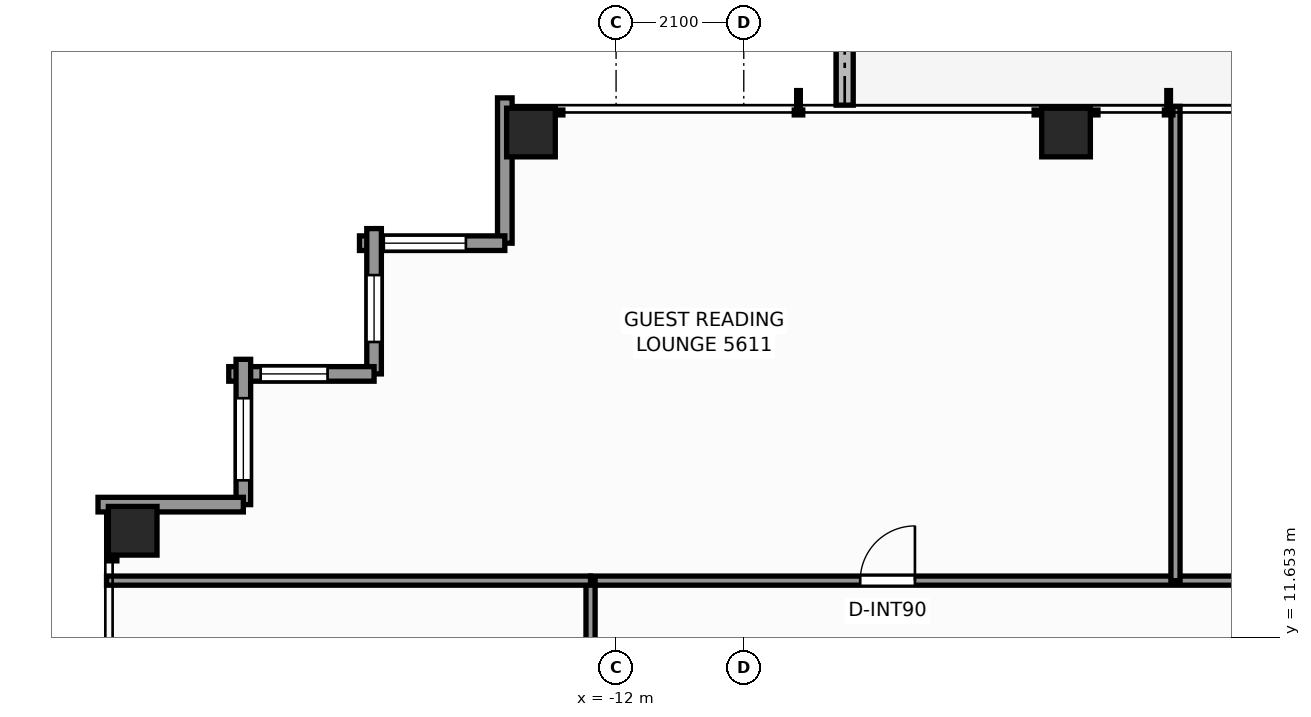
"""IFC4 building model, lengths in metres.
Left out: names, types, materials, properties, quantities, classifications, styles, units other than length and angle.
Written with IfcOpenShell. Run it as: python <this file> out.ifc"""

import sys

from ifc_helpers import new_model, si_unit, direction, frame, frame_2d, origin, origin_2d, place, context, subcontext, project, spatial, rectangle, extrude, element, fill, save


model = new_model("IFC4")
c1 = context("Model", 3, precision=1e-05, world=origin(), true_north=direction((0.0, 1.0)))
c2 = subcontext(c1, "Body", "Model", "MODEL_VIEW")
j1 = project(units=[si_unit("LENGTHUNIT", "METRE"), si_unit("PLANEANGLEUNIT", "RADIAN")], contexts=[c1])
p1 = place(None, origin())
s1 = spatial("IfcSite", under=j1, at=p1, CompositionType="ELEMENT")
p2 = place(p1, origin())
s2 = spatial("IfcBuilding", under=s1, at=p2, CompositionType="ELEMENT")
p3 = place(p2, frame((0.0, 0.0, 193.2)))
s3 = spatial("IfcBuildingStorey", under=s2, at=p3, CompositionType="ELEMENT", Elevation=193.2)
for number, where, z_axis, x_axis in (
    (1, (-13.4, 19.95, 0.0), (0.0, 0.0, 1.0), (1.0, 0.0, 0.0)),
    (2, (-4.6, 19.95, 0.0), (0.0, 0.0, 1.0), (1.0, 0.0, 0.0)),
    (3, (-19.95, 13.4, 0.0), (0.0, 0.0, 1.0), (1.0, 0.0, 0.0)),
):
    element("IfcColumn", number, at=place(p3, frame(where, z_axis=z_axis, x_axis=x_axis)), inside=s3, PredefinedType="COLUMN", context=c2, shape_type="SweptSolid", body=[
        extrude(rectangle(XDim=0.8, YDim=0.8, at=origin_2d()), origin(), (0.0, 0.0, 1.0), 3.3),
    ])
p4 = place(p3, frame((-8.24, 23.767, -0.04), z_axis=(0.0, 0.0, 1.0), x_axis=(0.0, -1.0, 0.0)))
e4 = element("IfcWall", 4, at=p4, inside=s3, PredefinedType="PARAPET", context=c2, shape_type="SweptSolid", body=[
    extrude(rectangle(XDim=3.367, YDim=0.28, at=frame_2d((1.684, 0.0))), origin(), (0.0, 0.0, 1.0), 0.42),
])
p5 = place(p3, frame((-13.83, 18.13, 0.0), z_axis=(0.0, 0.0, 1.0), x_axis=(0.0, 1.0, 0.0)))
e5 = element("IfcWall", 5, at=p5, inside=s3, PredefinedType="STANDARD", context=c2, shape_type="SweptSolid", body=[
    extrude(rectangle(XDim=2.39, YDim=0.24, at=frame_2d((1.195, 0.0))), origin(), (0.0, 0.0, 1.0), 2.463),
])
p6 = place(p3, frame((-16.22, 18.13, 0.0), z_axis=(0.0, 0.0, 1.0), x_axis=(1.0, 0.0, 0.0)))
e6 = element("IfcWall", 6, at=p6, inside=s3, PredefinedType="STANDARD", context=c2, shape_type="SweptSolid", body=[
    extrude(rectangle(XDim=2.39, YDim=0.24, at=frame_2d((1.195, 0.0))), origin(), (0.0, 0.0, 1.0), 2.463),
])
p7 = place(p6, frame((0.4, 0.0, 0.65)))
e7 = element("IfcOpeningElement", 7, at=p7, cuts=e6, PredefinedType="OPENING", context=c2, shape_type="SweptSolid", body=[
    extrude(rectangle(XDim=1.35, YDim=1.55, at=frame_2d((0.675, 0.775))), frame((0.0, 0.13, 0.0), z_axis=(0.0, -1.0, 0.0), x_axis=(1.0, 0.0, 0.0)), (0.0, 0.0, 1.0), 0.26),
])
p8 = place(p3, frame((-15.98, 15.98, 0.0), z_axis=(0.0, 0.0, 1.0), x_axis=(0.0, 1.0, 0.0)))
e8 = element("IfcWall", 8, at=p8, inside=s3, PredefinedType="STANDARD", context=c2, shape_type="SweptSolid", body=[
    extrude(rectangle(XDim=2.39, YDim=0.24, at=frame_2d((1.195, 0.0))), origin(), (0.0, 0.0, 1.0), 2.463),
])
p9 = place(p8, frame((0.525, 0.0, 0.65)))
e9 = element("IfcOpeningElement", 9, at=p9, cuts=e8, PredefinedType="OPENING", context=c2, shape_type="SweptSolid", body=[
    extrude(rectangle(XDim=1.1, YDim=1.45, at=frame_2d((0.55, 0.725))), frame((0.0, 0.13, 0.0), z_axis=(0.0, -1.0, 0.0), x_axis=(1.0, 0.0, 0.0)), (0.0, 0.0, 1.0), 0.26),
])
p10 = place(p3, frame((-18.37, 15.98, 0.0), z_axis=(0.0, 0.0, 1.0), x_axis=(1.0, 0.0, 0.0)))
e10 = element("IfcWall", 10, at=p10, inside=s3, PredefinedType="STANDARD", context=c2, shape_type="SweptSolid", body=[
    extrude(rectangle(XDim=2.39, YDim=0.24, at=frame_2d((1.195, 0.0))), origin(), (0.0, 0.0, 1.0), 2.463),
])
p11 = place(p10, frame((0.525, 0.0, 0.65)))
e11 = element("IfcOpeningElement", 11, at=p11, cuts=e10, PredefinedType="OPENING", context=c2, shape_type="SweptSolid", body=[
    extrude(rectangle(XDim=1.1, YDim=1.45, at=frame_2d((0.55, 0.725))), frame((0.0, 0.13, 0.0), z_axis=(0.0, -1.0, 0.0), x_axis=(1.0, 0.0, 0.0)), (0.0, 0.0, 1.0), 0.26),
])
p12 = place(p3, frame((-18.13, 13.83, 0.0), z_axis=(0.0, 0.0, 1.0), x_axis=(0.0, 1.0, 0.0)))
e12 = element("IfcWall", 12, at=p12, inside=s3, PredefinedType="STANDARD", context=c2, shape_type="SweptSolid", body=[
    extrude(rectangle(XDim=2.39, YDim=0.24, at=frame_2d((1.195, 0.0))), origin(), (0.0, 0.0, 1.0), 2.463),
])
p13 = place(p12, frame((0.4, 0.0, 0.65)))
e13 = element("IfcOpeningElement", 13, at=p13, cuts=e12, PredefinedType="OPENING", context=c2, shape_type="SweptSolid", body=[
    extrude(rectangle(XDim=1.35, YDim=1.55, at=frame_2d((0.675, 0.775))), frame((0.0, 0.13, 0.0), z_axis=(0.0, -1.0, 0.0), x_axis=(1.0, 0.0, 0.0)), (0.0, 0.0, 1.0), 0.26),
])
p14 = place(p3, frame((-20.52, 13.83, 0.0), z_axis=(0.0, 0.0, 1.0), x_axis=(1.0, 0.0, 0.0)))
e14 = element("IfcWall", 14, at=p14, inside=s3, PredefinedType="STANDARD", context=c2, shape_type="SweptSolid", body=[
    extrude(rectangle(XDim=2.39, YDim=0.24, at=frame_2d((1.195, 0.0))), origin(), (0.0, 0.0, 1.0), 2.463),
])
p15 = place(p3, frame((-12.42, 12.58, 0.0), z_axis=(0.0, 0.0, 1.0), x_axis=(1.0, 0.0, 0.0)))
e15 = element("IfcWall", 15, at=p15, inside=s3, PredefinedType="PARTITIONING", context=c2, shape_type="SweptSolid", body=[
    extrude(rectangle(XDim=24.84, YDim=0.15, at=frame_2d((12.42, 0.0))), origin(), (0.0, 0.0, 1.0), 2.369),
])
p16 = place(p15, frame((4.435, 0.0, 0.0)))
e16 = element("IfcOpeningElement", 16, at=p16, cuts=e15, PredefinedType="OPENING", context=c2, shape_type="SweptSolid", body=[
    extrude(rectangle(XDim=0.9, YDim=2.06, at=frame_2d((0.45, 1.03))), frame((0.0, 0.085, 0.0), z_axis=(0.0, -1.0, 0.0), x_axis=(1.0, 0.0, 0.0)), (0.0, 0.0, 1.0), 0.17),
])
p17 = place(p15, frame((19.505, 0.0, 0.0)))
e17 = element("IfcOpeningElement", 17, at=p17, cuts=e15, PredefinedType="OPENING", context=c2, shape_type="SweptSolid", body=[
    extrude(rectangle(XDim=0.9, YDim=2.06, at=frame_2d((0.45, 1.03))), frame((0.0, 0.085, 0.0), z_axis=(0.0, -1.0, 0.0), x_axis=(1.0, 0.0, 0.0)), (0.0, 0.0, 1.0), 0.17),
])
p18 = place(p3, frame((-12.42, -12.26, 0.0), z_axis=(0.0, 0.0, 1.0), x_axis=(0.0, 1.0, 0.0)))
e18 = element("IfcWall", 18, at=p18, inside=s3, PredefinedType="PARTITIONING", context=c2, shape_type="SweptSolid", body=[
    extrude(rectangle(XDim=24.84, YDim=0.15, at=frame_2d((12.42, 0.0))), origin(), (0.0, 0.0, 1.0), 2.369),
])
p19 = place(p18, frame((3.573, 0.0, 0.0)))
e19 = element("IfcOpeningElement", 19, at=p19, cuts=e18, PredefinedType="OPENING", context=c2, shape_type="SweptSolid", body=[
    extrude(rectangle(XDim=0.95, YDim=2.06, at=frame_2d((0.475, 1.03))), frame((0.0, 0.085, 0.0), z_axis=(0.0, -1.0, 0.0), x_axis=(1.0, 0.0, 0.0)), (0.0, 0.0, 1.0), 0.17),
])
p20 = place(p18, frame((9.755, 0.0, 0.0)))
e20 = element("IfcOpeningElement", 20, at=p20, cuts=e18, PredefinedType="OPENING", context=c2, shape_type="SweptSolid", body=[
    extrude(rectangle(XDim=0.95, YDim=2.06, at=frame_2d((0.475, 1.03))), frame((0.0, 0.085, 0.0), z_axis=(0.0, -1.0, 0.0), x_axis=(1.0, 0.0, 0.0)), (0.0, 0.0, 1.0), 0.17),
])
p21 = place(p18, frame((19.32, 0.0, 0.0)))
e21 = element("IfcOpeningElement", 21, at=p21, cuts=e18, PredefinedType="OPENING", context=c2, shape_type="SweptSolid", body=[
    extrude(rectangle(XDim=0.95, YDim=2.06, at=frame_2d((0.475, 1.03))), frame((0.0, 0.085, 0.0), z_axis=(0.0, -1.0, 0.0), x_axis=(1.0, 0.0, 0.0)), (0.0, 0.0, 1.0), 0.17),
])
p22 = place(p3, frame((-20.38, 12.58, 0.0), z_axis=(0.0, 0.0, 1.0), x_axis=(1.0, 0.0, 0.0)))
e22 = element("IfcWall", 22, at=p22, inside=s3, PredefinedType="PARTITIONING", context=c2, shape_type="SweptSolid", body=[
    extrude(rectangle(XDim=7.96, YDim=0.15, at=frame_2d((3.98, 0.0))), origin(), (0.0, 0.0, 1.0), 2.369),
])
p23 = place(p3, frame((-2.8, 12.58, 0.0), z_axis=(0.0, 0.0, 1.0), x_axis=(0.0, 1.0, 0.0)))
e23 = element("IfcWall", 23, at=p23, inside=s3, PredefinedType="PARTITIONING", context=c2, shape_type="SweptSolid", body=[
    extrude(rectangle(XDim=7.8, YDim=0.15, at=frame_2d((3.9, 0.0))), origin(), (0.0, 0.0, 1.0), 2.453),
])
p24 = place(p7, origin())
e24 = element("IfcWindow", 24, at=p24, inside=s3, PartitioningType="SINGLE_PANEL", PredefinedType="WINDOW", context=c2, shape_type="SweptSolid", body=[
    extrude(rectangle(XDim=1.35, YDim=1.55, at=frame_2d((0.675, 0.775))), frame((0.0, 0.03, 0.0), z_axis=(0.0, -1.0, 0.0), x_axis=(1.0, 0.0, 0.0)), (0.0, 0.0, 1.0), 0.06),
])
fill(e7, e24)
p25 = place(p9, origin())
e25 = element("IfcWindow", 25, at=p25, inside=s3, PartitioningType="SINGLE_PANEL", PredefinedType="WINDOW", context=c2, shape_type="SweptSolid", body=[
    extrude(rectangle(XDim=1.1, YDim=1.45, at=frame_2d((0.55, 0.725))), frame((0.0, 0.03, 0.0), z_axis=(0.0, -1.0, 0.0), x_axis=(1.0, 0.0, 0.0)), (0.0, 0.0, 1.0), 0.06),
])
fill(e9, e25)
p26 = place(p11, origin())
e26 = element("IfcWindow", 26, at=p26, inside=s3, PartitioningType="SINGLE_PANEL", PredefinedType="WINDOW", context=c2, shape_type="SweptSolid", body=[
    extrude(rectangle(XDim=1.1, YDim=1.45, at=frame_2d((0.55, 0.725))), frame((0.0, 0.03, 0.0), z_axis=(0.0, -1.0, 0.0), x_axis=(1.0, 0.0, 0.0)), (0.0, 0.0, 1.0), 0.06),
])
fill(e11, e26)
p27 = place(p13, origin())
e27 = element("IfcWindow", 27, at=p27, inside=s3, PartitioningType="SINGLE_PANEL", PredefinedType="WINDOW", context=c2, shape_type="SweptSolid", body=[
    extrude(rectangle(XDim=1.35, YDim=1.55, at=frame_2d((0.675, 0.775))), frame((0.0, 0.03, 0.0), z_axis=(0.0, -1.0, 0.0), x_axis=(1.0, 0.0, 0.0)), (0.0, 0.0, 1.0), 0.06),
])
fill(e13, e27)
p28 = place(p16, origin())
e28 = element("IfcDoor", 28, at=p28, inside=s3, OperationType="SINGLE_SWING_RIGHT", PredefinedType="DOOR", context=c2, shape_type="SweptSolid", body=[
    extrude(rectangle(XDim=0.9, YDim=2.06, at=frame_2d((0.45, 1.03))), frame((0.0, 0.025, 0.0), z_axis=(0.0, -1.0, 0.0), x_axis=(1.0, 0.0, 0.0)), (0.0, 0.0, 1.0), 0.05),
])
fill(e16, e28)
save(model, sys.argv[1])
